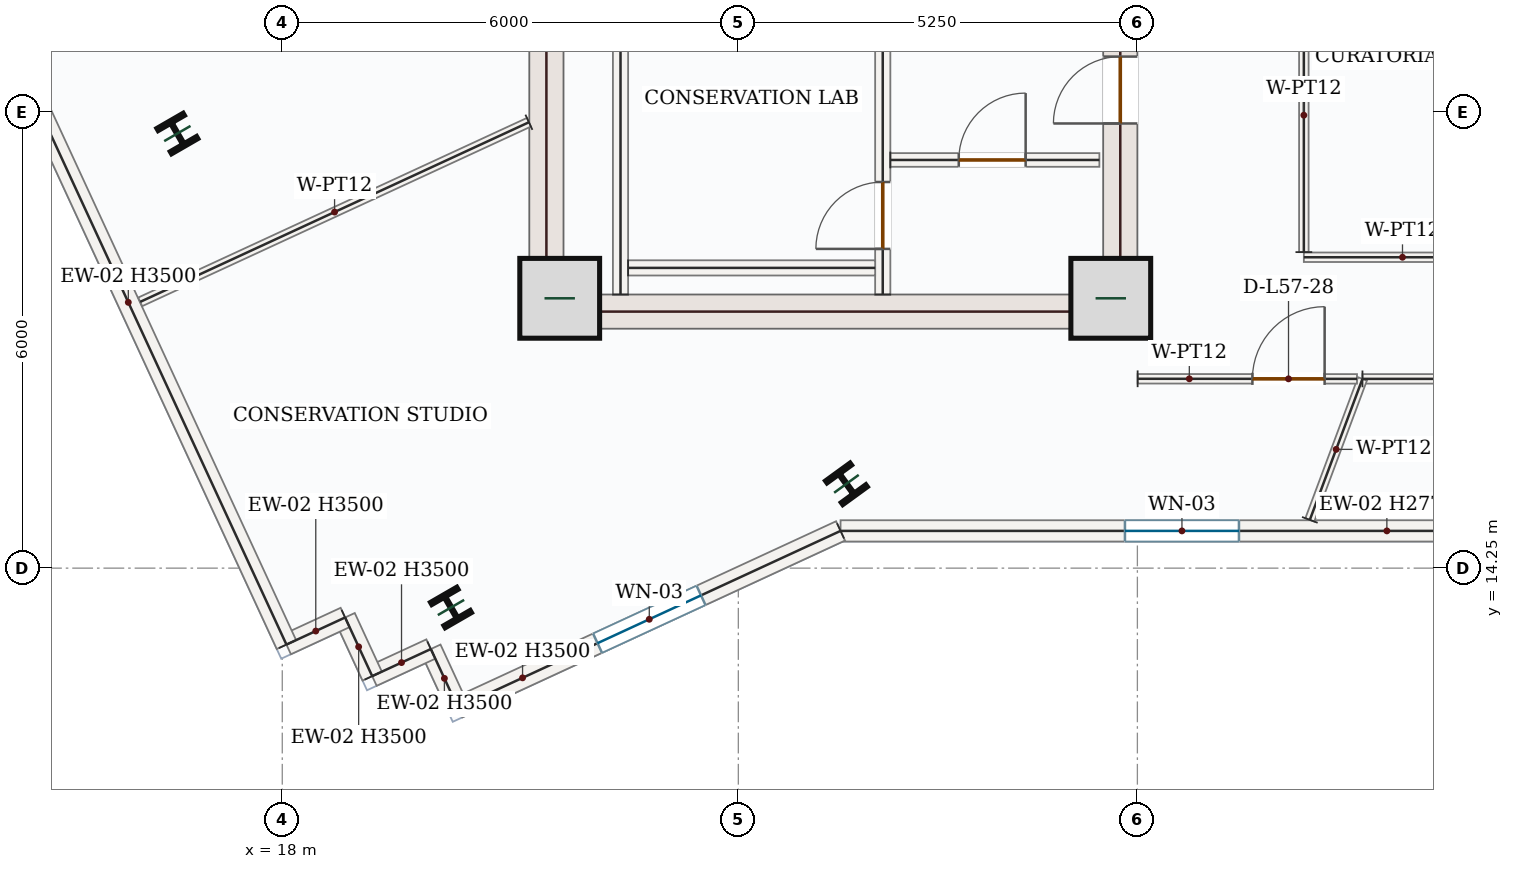
"""IFC4 building model, lengths in metres.
Left out: names, types, materials, properties, quantities, classifications, styles, units other than length and angle.
Written with IfcOpenShell. Run it as: python <this file> out.ifc"""

import sys

from ifc_helpers import new_model, si_unit, direction, frame, frame_2d, origin, origin_2d, place, context, subcontext, project, spatial, rectangle, i_section, extrude, source, transform, mapped, element, fill, save


model = new_model("IFC4")
c1 = context("Model", 3, precision=1e-05, world=origin(), true_north=direction((0.0, 1.0)))
c2 = subcontext(c1, "Body", "Model", "MODEL_VIEW")
j1 = project(units=[si_unit("LENGTHUNIT", "METRE"), si_unit("PLANEANGLEUNIT", "RADIAN")], contexts=[c1])
p1 = place(None, origin())
s1 = spatial("IfcSite", under=j1, at=p1, CompositionType="ELEMENT")
p2 = place(p1, origin())
s2 = spatial("IfcBuilding", under=s1, at=p2, CompositionType="ELEMENT")
p3 = place(p2, frame((0.0, 0.0, 242.85)))
s3 = spatial("IfcBuildingStorey", under=s2, at=p3, CompositionType="ELEMENT", Elevation=242.85)
m1 = source(origin(), c2, "Body", "SweptSolid", [
    extrude(rectangle(XDim=8.55, YDim=0.45, at=frame_2d((4.275, 0.0))), origin(), (0.0, 0.0, 1.0), 3.5),
])
p4 = place(p3, frame((21.475, 17.4, 0.0), z_axis=(0.0, 0.0, 1.0), x_axis=(0.0, 1.0, 0.0)))
e1 = element("IfcWall", 1, at=p4, inside=s3, PredefinedType="SHEAR", context=c2, shape_type="MappedRepresentation", body=[
    mapped(m1, transform((0.0, 0.0, 0.0), x_axis=(1.0, 0.0, 0.0), y_axis=(0.0, 1.0, 0.0), z_axis=(0.0, 0.0, 1.0), scale=1.0)),
])
p5 = place(p3, frame((29.025, 17.4, 0.0), z_axis=(0.0, 0.0, 1.0), x_axis=(0.0, 1.0, 0.0)))
e2 = element("IfcWall", 2, at=p5, inside=s3, PredefinedType="SHEAR", context=c2, shape_type="SweptSolid", body=[
    extrude(rectangle(XDim=8.55, YDim=0.45, at=frame_2d((4.275, 0.0))), origin(), (0.0, 0.0, 1.0), 3.5),
])
p6 = place(p5, frame((6.65, 0.0, 0.0)))
e3 = element("IfcOpeningElement", 3, at=p6, cuts=e2, PredefinedType="OPENING", context=c2, shape_type="SweptSolid", body=[
    extrude(rectangle(XDim=1.1, YDim=2.2, at=frame_2d((0.55, 1.1))), frame((0.0, 0.235, 0.0), z_axis=(0.0, -1.0, 0.0), x_axis=(1.0, 0.0, 0.0)), (0.0, 0.0, 1.0), 0.47),
])
p7 = place(p5, frame((2.7, 0.0, 0.0)))
e4 = element("IfcOpeningElement", 4, at=p7, cuts=e2, PredefinedType="OPENING", context=c2, shape_type="SweptSolid", body=[
    extrude(rectangle(XDim=0.88, YDim=2.1, at=frame_2d((0.44, 1.05))), frame((0.0, 0.235, 0.0), z_axis=(0.0, -1.0, 0.0), x_axis=(1.0, 0.0, 0.0)), (0.0, 0.0, 1.0), 0.47),
])
p8 = place(p5, frame((4.6, 0.0, 0.0)))
e5 = element("IfcOpeningElement", 5, at=p8, cuts=e2, PredefinedType="OPENING", context=c2, shape_type="SweptSolid", body=[
    extrude(rectangle(XDim=0.88, YDim=2.1, at=frame_2d((0.44, 1.05))), frame((0.0, 0.235, 0.0), z_axis=(0.0, -1.0, 0.0), x_axis=(1.0, 0.0, 0.0)), (0.0, 0.0, 1.0), 0.47),
])
m2 = source(origin(), c2, "Body", "SweptSolid", [
    extrude(rectangle(XDim=7.1, YDim=0.45, at=frame_2d((3.55, 0.0))), origin(), (0.0, 0.0, 1.0), 3.5),
])
p9 = place(p3, frame((21.7, 17.625, 0.0), z_axis=(0.0, 0.0, 1.0), x_axis=(1.0, 0.0, 0.0)))
e6 = element("IfcWall", 6, at=p9, inside=s3, PredefinedType="SHEAR", context=c2, shape_type="MappedRepresentation", body=[
    mapped(m2, transform((0.0, 0.0, 0.0), x_axis=(1.0, 0.0, 0.0), y_axis=(0.0, 1.0, 0.0), z_axis=(0.0, 0.0, 1.0), scale=1.0)),
])
m3 = source(origin(), c2, "Body", "SweptSolid", [
    extrude(rectangle(XDim=1.05, YDim=1.05, at=origin_2d()), origin(), (0.0, 0.0, 1.0), 3.75),
])
for number, where, z_axis, x_axis in (
    (7, (21.65, 17.8, 0.0), (0.0, 0.0, 1.0), (1.0, 0.0, 0.0)),
    (8, (28.9, 17.8, 0.0), (0.0, 0.0, 1.0), (1.0, 0.0, 0.0)),
):
    element("IfcColumn", number, at=place(p3, frame(where, z_axis=z_axis, x_axis=x_axis)), inside=s3, PredefinedType="COLUMN", context=c2, shape_type="MappedRepresentation", body=[
        mapped(m3, transform((0.0, 0.0, 0.0), x_axis=(1.0, 0.0, 0.0), y_axis=(0.0, 1.0, 0.0), z_axis=(0.0, 0.0, 1.0), scale=1.0)),
    ])
m4 = source(origin(), c2, "Body", "SweptSolid", [
    extrude(i_section(OverallWidth=0.399, OverallDepth=0.386, WebThickness=0.021, FlangeThickness=0.033, FilletRadius=0.018, at=origin_2d()), origin(), (0.0, 0.0, 1.0), 3.75),
])
for number, where, z_axis, x_axis in (
    (9, (25.422, 15.359, 0.0), (0.0, 0.0, 1.0), (0.809, 0.588, 0.0)),
    (10, (16.62, 19.968, 0.0), (0.0, 0.0, 1.0), (0.866, 0.5, 0.0)),
    (11, (20.22, 13.732, 0.0), (0.0, 0.0, 1.0), (0.866, 0.5, 0.0)),
):
    element("IfcColumn", number, at=place(p3, frame(where, z_axis=z_axis, x_axis=x_axis)), inside=s3, PredefinedType="COLUMN", context=c2, shape_type="MappedRepresentation", body=[
        mapped(m4, transform((0.0, 0.0, 0.0), x_axis=(1.0, 0.0, 0.0), y_axis=(0.0, 1.0, 0.0), z_axis=(0.0, 0.0, 1.0), scale=1.0)),
    ])
p10 = place(p3, frame((34.328, 14.74, 0.0), z_axis=(0.0, 0.0, 1.0), x_axis=(-1.0, 0.0, 0.0)))
e12 = element("IfcWall", 12, at=p10, inside=s3, PredefinedType="SOLIDWALL", context=c2, shape_type="SweptSolid", body=[
    extrude(rectangle(XDim=8.984, YDim=0.28, at=frame_2d((4.492, 0.0))), origin(), (0.0, 0.0, 1.0), 2.772),
])
p11 = place(p10, frame((3.742, 0.0, 0.85)))
e13 = element("IfcOpeningElement", 13, at=p11, cuts=e12, PredefinedType="OPENING", context=c2, shape_type="SweptSolid", body=[
    extrude(rectangle(XDim=1.5, YDim=1.5, at=frame_2d((0.75, 0.75))), frame((0.0, 0.15, 0.0), z_axis=(0.0, -1.0, 0.0), x_axis=(1.0, 0.0, 0.0)), (0.0, 0.0, 1.0), 0.3),
])
p12 = place(p3, frame((25.345, 14.74, 0.0), z_axis=(0.0, 0.0, 1.0), x_axis=(-0.907767275269, -0.419474163627, 0.0)))
e14 = element("IfcWall", 14, at=p12, inside=s3, PredefinedType="SOLIDWALL", context=c2, shape_type="SweptSolid", body=[
    extrude(rectangle(XDim=5.545, YDim=0.28, at=frame_2d((2.772, 0.0))), origin(), (0.0, 0.0, 1.0), 3.5),
])
p13 = place(p12, frame((2.022, 0.0, 0.85)))
e15 = element("IfcOpeningElement", 15, at=p13, cuts=e14, PredefinedType="OPENING", context=c2, shape_type="SweptSolid", body=[
    extrude(rectangle(XDim=1.5, YDim=1.5, at=frame_2d((0.75, 0.75))), frame((0.0, 0.15, 0.0), z_axis=(0.0, -1.0, 0.0), x_axis=(1.0, 0.0, 0.0)), (0.0, 0.0, 1.0), 0.3),
])
m5 = source(origin(), c2, "Body", "SweptSolid", [
    extrude(rectangle(XDim=0.85, YDim=0.28, at=frame_2d((0.425, 0.0))), origin(), (0.0, 0.0, 1.0), 3.5),
])
p14 = place(p3, frame((20.311, 12.414, 0.0), z_axis=(0.0, 0.0, 1.0), x_axis=(-0.419549800563, 0.907732320041, 0.0)))
e16 = element("IfcWall", 16, at=p14, inside=s3, PredefinedType="SOLIDWALL", context=c2, shape_type="MappedRepresentation", body=[
    mapped(m5, transform((0.0, 0.0, 0.0), x_axis=(1.0, 0.0, 0.0), y_axis=(0.0, 1.0, 0.0), z_axis=(0.0, 0.0, 1.0), scale=1.0)),
])
m6 = source(origin(), c2, "Body", "SweptSolid", [
    extrude(rectangle(XDim=0.85, YDim=0.28, at=frame_2d((0.425, 0.0))), origin(), (0.0, 0.0, 1.0), 3.5),
])
p15 = place(p3, frame((19.955, 13.186, 0.0), z_axis=(0.0, 0.0, 1.0), x_axis=(-0.907681752694, -0.41965919009, 0.0)))
e17 = element("IfcWall", 17, at=p15, inside=s3, PredefinedType="SOLIDWALL", context=c2, shape_type="MappedRepresentation", body=[
    mapped(m6, transform((0.0, 0.0, 0.0), x_axis=(1.0, 0.0, 0.0), y_axis=(0.0, 1.0, 0.0), z_axis=(0.0, 0.0, 1.0), scale=1.0)),
])
for number, where, z_axis, x_axis in (
    (18, (19.183, 12.829, 0.0), (0.0, 0.0, 1.0), (-0.419, 0.908, 0.0)),
    (19, (18.827, 13.601, 0.0), (0.0, 0.0, 1.0), (-0.908, -0.419, 0.0)),
):
    element("IfcWall", number, at=place(p3, frame(where, z_axis=z_axis, x_axis=x_axis)), inside=s3, PredefinedType="SOLIDWALL", context=c2, shape_type="MappedRepresentation", body=[
        mapped(m5, transform((0.0, 0.0, 0.0), x_axis=(1.0, 0.0, 0.0), y_axis=(0.0, 1.0, 0.0), z_axis=(0.0, 0.0, 1.0), scale=1.0)),
    ])
m7 = source(origin(), c2, "Body", "SweptSolid", [
    extrude(rectangle(XDim=9.92, YDim=0.28, at=frame_2d((4.96, 0.0))), origin(), (0.0, 0.0, 1.0), 3.5),
])
p16 = place(p3, frame((18.055, 13.244, 0.0), z_axis=(0.0, 0.0, 1.0), x_axis=(-0.41946703495, 0.907770569357, 0.0)))
e20 = element("IfcWall", 20, at=p16, inside=s3, PredefinedType="SOLIDWALL", context=c2, shape_type="MappedRepresentation", body=[
    mapped(m7, transform((0.0, 0.0, 0.0), x_axis=(1.0, 0.0, 0.0), y_axis=(0.0, 1.0, 0.0), z_axis=(0.0, 0.0, 1.0), scale=1.0)),
])
m8 = source(origin(), c2, "Body", "SweptSolid", [
    extrude(rectangle(XDim=7.87, YDim=0.2, at=frame_2d((3.935, 0.0))), origin(), (0.0, 0.0, 1.0), 3.5),
])
p17 = place(p3, frame((22.45, 17.85, 0.0), z_axis=(0.0, 0.0, 1.0), x_axis=(0.0, 1.0, 0.0)))
e21 = element("IfcWall", 21, at=p17, inside=s3, PredefinedType="SOLIDWALL", context=c2, shape_type="MappedRepresentation", body=[
    mapped(m8, transform((0.0, 0.0, 0.0), x_axis=(1.0, 0.0, 0.0), y_axis=(0.0, 1.0, 0.0), z_axis=(0.0, 0.0, 1.0), scale=1.0)),
])
p18 = place(p3, frame((25.9, 17.85, 0.0), z_axis=(0.0, 0.0, 1.0), x_axis=(0.0, 1.0, 0.0)))
e22 = element("IfcWall", 22, at=p18, inside=s3, PredefinedType="SOLIDWALL", context=c2, shape_type="SweptSolid", body=[
    extrude(rectangle(XDim=8.0, YDim=0.2, at=frame_2d((4.0, 0.0))), origin(), (0.0, 0.0, 1.0), 3.5),
])
p19 = place(p18, frame((6.2, 0.0, 0.0)))
e23 = element("IfcOpeningElement", 23, at=p19, cuts=e22, PredefinedType="OPENING", context=c2, shape_type="SweptSolid", body=[
    extrude(rectangle(XDim=1.0, YDim=2.15, at=frame_2d((0.5, 1.075))), frame((0.0, 0.11, 0.0), z_axis=(0.0, -1.0, 0.0), x_axis=(1.0, 0.0, 0.0)), (0.0, 0.0, 1.0), 0.22),
])
p20 = place(p18, frame((0.6, 0.0, 0.0)))
e24 = element("IfcOpeningElement", 24, at=p20, cuts=e22, PredefinedType="OPENING", context=c2, shape_type="SweptSolid", body=[
    extrude(rectangle(XDim=0.88, YDim=2.1, at=frame_2d((0.44, 1.05))), frame((0.0, 0.11, 0.0), z_axis=(0.0, -1.0, 0.0), x_axis=(1.0, 0.0, 0.0)), (0.0, 0.0, 1.0), 0.22),
])
m9 = source(origin(), c2, "Body", "SweptSolid", [
    extrude(rectangle(XDim=3.25, YDim=0.2, at=frame_2d((1.625, 0.0))), origin(), (0.0, 0.0, 1.0), 3.5),
])
p21 = place(p3, frame((22.55, 18.2, 0.0), z_axis=(0.0, 0.0, 1.0), x_axis=(1.0, 0.0, 0.0)))
e25 = element("IfcWall", 25, at=p21, inside=s3, PredefinedType="SOLIDWALL", context=c2, shape_type="MappedRepresentation", body=[
    mapped(m9, transform((0.0, 0.0, 0.0), x_axis=(1.0, 0.0, 0.0), y_axis=(0.0, 1.0, 0.0), z_axis=(0.0, 0.0, 1.0), scale=1.0)),
])
p22 = place(p3, frame((26.0, 19.62, 0.0), z_axis=(0.0, 0.0, 1.0), x_axis=(1.0, 0.0, 0.0)))
e26 = element("IfcWall", 26, at=p22, inside=s3, PredefinedType="PARTITIONING", context=c2, shape_type="SweptSolid", body=[
    extrude(rectangle(XDim=2.75, YDim=0.18, at=frame_2d((1.375, 0.0))), origin(), (0.0, 0.0, 1.0), 3.5),
])
p23 = place(p22, frame((0.9, 0.0, 0.0)))
e27 = element("IfcOpeningElement", 27, at=p23, cuts=e26, PredefinedType="OPENING", context=c2, shape_type="SweptSolid", body=[
    extrude(rectangle(XDim=0.88, YDim=2.1, at=frame_2d((0.44, 1.05))), frame((0.0, 0.1, 0.0), z_axis=(0.0, -1.0, 0.0), x_axis=(1.0, 0.0, 0.0)), (0.0, 0.0, 1.0), 0.2),
])
p24 = place(p3, frame((35.91, 18.34, 0.0), z_axis=(0.0, 0.0, 1.0), x_axis=(-1.0, 0.0, 0.0)))
e28 = element("IfcWall", 28, at=p24, inside=s3, PredefinedType="PARTITIONING", context=c2, shape_type="SweptSolid", body=[
    extrude(rectangle(XDim=4.47, YDim=0.125, at=frame_2d((2.235, 0.0))), origin(), (0.0, 0.0, 1.0), 3.5),
])
p25 = place(p24, frame((0.774, 0.0, 0.0)))
e29 = element("IfcOpeningElement", 29, at=p25, cuts=e28, PredefinedType="OPENING", context=c2, shape_type="SweptSolid", body=[
    extrude(rectangle(XDim=0.95, YDim=2.15, at=frame_2d((0.475, 1.075))), frame((0.0, 0.073, 0.0), z_axis=(0.0, -1.0, 0.0), x_axis=(1.0, 0.0, 0.0)), (0.0, 0.0, 1.0), 0.145),
])
m10 = source(origin(), c2, "Body", "SweptSolid", [
    extrude(rectangle(XDim=3.603, YDim=0.125, at=frame_2d((1.801, 0.0))), origin(), (0.0, 0.0, 1.0), 3.5),
])
p26 = place(p3, frame((31.44, 18.407, 0.0), z_axis=(0.0, 0.0, 1.0), x_axis=(0.0, 1.0, 0.0)))
e30 = element("IfcWall", 30, at=p26, inside=s3, PredefinedType="PARTITIONING", context=c2, shape_type="MappedRepresentation", body=[
    mapped(m10, transform((0.0, 0.0, 0.0), x_axis=(1.0, 0.0, 0.0), y_axis=(0.0, 1.0, 0.0), z_axis=(0.0, 0.0, 1.0), scale=1.0)),
])
p27 = place(p3, frame((32.211, 16.74, 0.0), z_axis=(0.0, 0.0, 1.0), x_axis=(1.0, 0.0, 0.0)))
e31 = element("IfcWall", 31, at=p27, inside=s3, PredefinedType="PARTITIONING", context=c2, shape_type="SweptSolid", body=[
    extrude(rectangle(XDim=5.236, YDim=0.125, at=frame_2d((2.618, 0.0))), origin(), (0.0, 0.0, 1.0), 3.5),
])
p28 = place(p27, frame((3.343, 0.0, 0.0)))
e32 = element("IfcOpeningElement", 32, at=p28, cuts=e31, PredefinedType="OPENING", context=c2, shape_type="SweptSolid", body=[
    extrude(rectangle(XDim=0.95, YDim=2.15, at=frame_2d((0.475, 1.075))), frame((0.0, 0.073, 0.0), z_axis=(0.0, -1.0, 0.0), x_axis=(1.0, 0.0, 0.0)), (0.0, 0.0, 1.0), 0.145),
])
m11 = source(origin(), c2, "Body", "SweptSolid", [
    extrude(rectangle(XDim=1.98, YDim=0.125, at=frame_2d((0.99, 0.0))), origin(), (0.0, 0.0, 1.0), 3.5),
])
p29 = place(p3, frame((31.519, 14.885, 0.0), z_axis=(0.0, 0.0, 1.0), x_axis=(0.349690675255, 0.9368652153, 0.0)))
e33 = element("IfcWall", 33, at=p29, inside=s3, PredefinedType="PARTITIONING", context=c2, shape_type="MappedRepresentation", body=[
    mapped(m11, transform((0.0, 0.0, 0.0), x_axis=(1.0, 0.0, 0.0), y_axis=(0.0, 1.0, 0.0), z_axis=(0.0, 0.0, 1.0), scale=1.0)),
])
m12 = source(origin(), c2, "Body", "SweptSolid", [
    extrude(rectangle(XDim=5.634, YDim=0.125, at=frame_2d((2.817, 0.0))), origin(), (0.0, 0.0, 1.0), 3.5),
])
p30 = place(p3, frame((21.245, 20.116, 0.0), z_axis=(0.0, 0.0, 1.0), x_axis=(-0.90777538002, -0.419456624014, 0.0)))
e34 = element("IfcWall", 34, at=p30, inside=s3, PredefinedType="PARTITIONING", context=c2, shape_type="MappedRepresentation", body=[
    mapped(m12, transform((0.0, 0.0, 0.0), x_axis=(1.0, 0.0, 0.0), y_axis=(0.0, 1.0, 0.0), z_axis=(0.0, 0.0, 1.0), scale=1.0)),
])
p31 = place(p3, frame((29.253, 16.741, 0.0), z_axis=(0.0, 0.0, 1.0), x_axis=(0.999999910531, -0.000423011806, 0.0)))
e35 = element("IfcWall", 35, at=p31, inside=s3, PredefinedType="PARTITIONING", context=c2, shape_type="SweptSolid", body=[
    extrude(rectangle(XDim=2.886, YDim=0.125, at=frame_2d((1.443, 0.0))), origin(), (0.0, 0.0, 1.0), 3.5),
])
p32 = place(p31, frame((1.51, 0.0, 0.0)))
e36 = element("IfcOpeningElement", 36, at=p32, cuts=e35, PredefinedType="OPENING", context=c2, shape_type="SweptSolid", body=[
    extrude(rectangle(XDim=0.95, YDim=2.15, at=frame_2d((0.475, 1.075))), frame((0.0, 0.073, 0.0), z_axis=(0.0, -1.0, 0.0), x_axis=(1.0, 0.0, 0.0)), (0.0, 0.0, 1.0), 0.145),
])
m13 = source(origin(), c2, "Body", "SweptSolid", [
    extrude(rectangle(XDim=1.5, YDim=1.5, at=frame_2d((0.75, 0.75))), frame((0.0, 0.03, 0.0), z_axis=(0.0, -1.0, 0.0), x_axis=(1.0, 0.0, 0.0)), (0.0, 0.0, 1.0), 0.06),
])
p33 = place(p11, origin())
e37 = element("IfcWindow", 37, at=p33, inside=s3, PartitioningType="SINGLE_PANEL", PredefinedType="WINDOW", context=c2, shape_type="MappedRepresentation", body=[
    mapped(m13, transform((0.0, 0.0, 0.0), x_axis=(1.0, 0.0, 0.0), y_axis=(0.0, 1.0, 0.0), z_axis=(0.0, 0.0, 1.0), scale=1.0)),
])
fill(e13, e37)
p34 = place(p13, origin())
e38 = element("IfcWindow", 38, at=p34, inside=s3, PartitioningType="SINGLE_PANEL", PredefinedType="WINDOW", context=c2, shape_type="MappedRepresentation", body=[
    mapped(m13, transform((0.0, 0.0, 0.0), x_axis=(1.0, 0.0, 0.0), y_axis=(0.0, 1.0, 0.0), z_axis=(0.0, 0.0, 1.0), scale=1.0)),
])
fill(e15, e38)
m14 = source(origin(), c2, "Body", "SweptSolid", [
    extrude(rectangle(XDim=0.88, YDim=2.1, at=frame_2d((0.44, 1.05))), frame((0.0, 0.025, 0.0), z_axis=(0.0, -1.0, 0.0), x_axis=(1.0, 0.0, 0.0)), (0.0, 0.0, 1.0), 0.05),
])
p35 = place(p20, origin())
e39 = element("IfcDoor", 39, at=p35, inside=s3, OperationType="SINGLE_SWING_LEFT", PredefinedType="DOOR", context=c2, shape_type="MappedRepresentation", body=[
    mapped(m14, transform((0.0, 0.0, 0.0), x_axis=(1.0, 0.0, 0.0), y_axis=(0.0, 1.0, 0.0), z_axis=(0.0, 0.0, 1.0), scale=1.0)),
])
fill(e24, e39)
p36 = place(p23, origin())
e40 = element("IfcDoor", 40, at=p36, inside=s3, OperationType="SINGLE_SWING_RIGHT", PredefinedType="DOOR", context=c2, shape_type="MappedRepresentation", body=[
    mapped(m14, transform((0.0, 0.0, 0.0), x_axis=(1.0, 0.0, 0.0), y_axis=(0.0, 1.0, 0.0), z_axis=(0.0, 0.0, 1.0), scale=1.0)),
])
fill(e27, e40)
p37 = place(p7, origin())
e41 = element("IfcDoor", 41, at=p37, inside=s3, OperationType="SINGLE_SWING_LEFT", PredefinedType="DOOR", context=c2, shape_type="MappedRepresentation", body=[
    mapped(m14, transform((0.0, 0.0, 0.0), x_axis=(1.0, 0.0, 0.0), y_axis=(0.0, 1.0, 0.0), z_axis=(0.0, 0.0, 1.0), scale=1.0)),
])
fill(e4, e41)
m15 = source(origin(), c2, "Body", "SweptSolid", [
    extrude(rectangle(XDim=0.95, YDim=2.15, at=frame_2d((0.475, 1.075))), frame((0.0, 0.025, 0.0), z_axis=(0.0, -1.0, 0.0), x_axis=(1.0, 0.0, 0.0)), (0.0, 0.0, 1.0), 0.05),
])
p38 = place(p32, origin())
e42 = element("IfcDoor", 42, at=p38, inside=s3, OperationType="SINGLE_SWING_RIGHT", PredefinedType="DOOR", context=c2, shape_type="MappedRepresentation", body=[
    mapped(m15, transform((0.0, 0.0, 0.0), x_axis=(1.0, 0.0, 0.0), y_axis=(0.0, 1.0, 0.0), z_axis=(0.0, 0.0, 1.0), scale=1.0)),
])
fill(e36, e42)
save(model, sys.argv[1])
